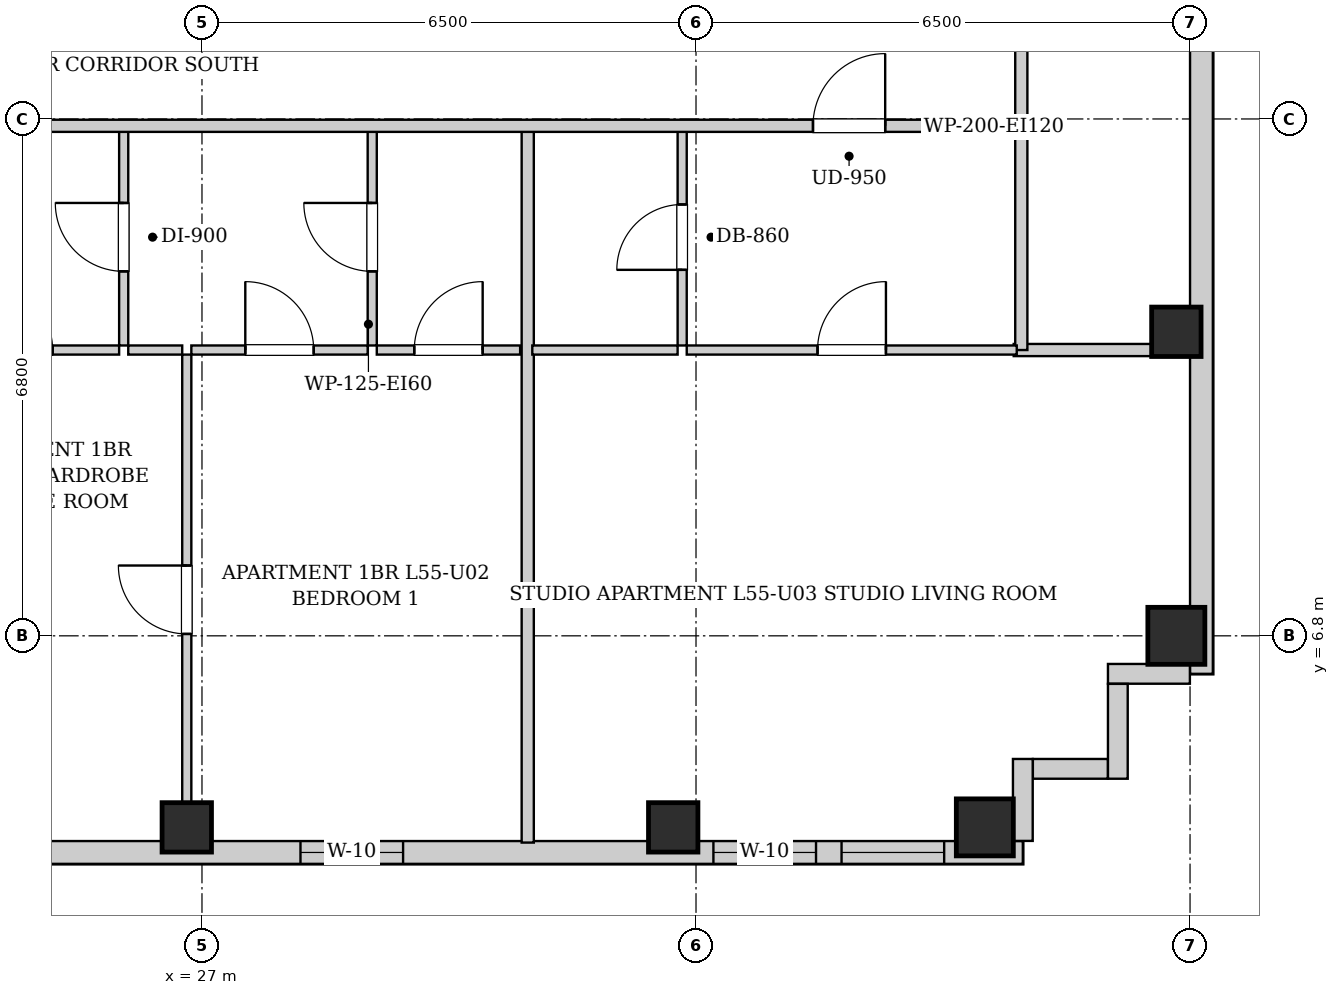
"""IFC4 building model, lengths in metres.
Left out: names, types, materials, properties, quantities, classifications, styles, units other than length and angle.
Written with IfcOpenShell. Run it as: python <this file> out.ifc"""

import sys

from ifc_helpers import new_model, si_unit, direction, frame, frame_2d, origin, origin_2d, place, context, subcontext, project, spatial, rectangle, extrude, element, fill, save


model = new_model("IFC4")
c1 = context("Model", 3, precision=1e-05, world=origin(), true_north=direction((0.0, 1.0)))
c2 = subcontext(c1, "Body", "Model", "MODEL_VIEW")
j1 = project(units=[si_unit("LENGTHUNIT", "METRE"), si_unit("PLANEANGLEUNIT", "RADIAN")], contexts=[c1])
p1 = place(None, origin())
s1 = spatial("IfcSite", under=j1, at=p1, CompositionType="ELEMENT")
p2 = place(p1, origin())
s2 = spatial("IfcBuilding", under=s1, at=p2, CompositionType="ELEMENT")
p3 = place(p2, frame((0.0, 0.0, 190.9)))
s3 = spatial("IfcBuildingStorey", under=s2, at=p3, CompositionType="ELEMENT", Elevation=190.9)
for number, where, z_axis, x_axis in (
    (1, (26.8, 4.28, 0.0), (0.0, 0.0, 1.0), (1.0, 0.0, 0.0)),
    (2, (33.2, 4.28, 0.0), (0.0, 0.0, 1.0), (1.0, 0.0, 0.0)),
):
    element("IfcColumn", number, at=place(p3, frame(where, z_axis=z_axis, x_axis=x_axis)), inside=s3, PredefinedType="COLUMN", context=c2, shape_type="SweptSolid", body=[
        extrude(rectangle(XDim=0.65, YDim=0.65, at=origin_2d()), origin(), (0.0, 0.0, 1.0), 3.3),
    ])
for number, where, z_axis, x_axis in (
    (3, (37.3, 4.28, 0.0), (0.0, 0.0, 1.0), (1.0, 0.0, 0.0)),
    (4, (39.82, 6.8, 0.0), (0.0, 0.0, 1.0), (1.0, 0.0, 0.0)),
):
    element("IfcColumn", number, at=place(p3, frame(where, z_axis=z_axis, x_axis=x_axis)), inside=s3, PredefinedType="COLUMN", context=c2, shape_type="SweptSolid", body=[
        extrude(rectangle(XDim=0.75, YDim=0.75, at=origin_2d()), origin(), (0.0, 0.0, 1.0), 3.3),
    ])
p4 = place(p3, frame((39.82, 10.8, 0.0), z_axis=(0.0, 0.0, 1.0), x_axis=(1.0, 0.0, 0.0)))
e5 = element("IfcColumn", 5, at=p4, inside=s3, PredefinedType="COLUMN", context=c2, shape_type="SweptSolid", body=[
    extrude(rectangle(XDim=0.65, YDim=0.65, at=origin_2d()), origin(), (0.0, 0.0, 1.0), 3.3),
])
p5 = place(p3, frame((40.15, 37.7, 0.0), z_axis=(0.0, 0.0, 1.0), x_axis=(0.0, -1.0, 0.0)))
e6 = element("IfcWall", 6, at=p5, inside=s3, PredefinedType="SOLIDWALL", context=c2, shape_type="SweptSolid", body=[
    extrude(rectangle(XDim=31.4, YDim=0.3, at=frame_2d((15.7, 0.0))), origin(), (0.0, 0.0, 1.0), 3.04),
])
p6 = place(p5, frame((1.504, 0.0, 0.55)))
e7 = element("IfcOpeningElement", 7, at=p6, cuts=e6, PredefinedType="OPENING", context=c2, shape_type="SweptSolid", body=[
    extrude(rectangle(XDim=1.35, YDim=1.2, at=frame_2d((0.675, 0.6))), frame((0.0, 0.16, 0.0), z_axis=(0.0, -1.0, 0.0), x_axis=(1.0, 0.0, 0.0)), (0.0, 0.0, 1.0), 0.32),
])
p7 = place(p5, frame((18.2, 0.0, 0.55)))
e8 = element("IfcOpeningElement", 8, at=p7, cuts=e6, PredefinedType="OPENING", context=c2, shape_type="SweptSolid", body=[
    extrude(rectangle(XDim=1.35, YDim=1.2, at=frame_2d((0.675, 0.6))), frame((0.0, 0.16, 0.0), z_axis=(0.0, -1.0, 0.0), x_axis=(1.0, 0.0, 0.0)), (0.0, 0.0, 1.0), 0.32),
])
p8 = place(p5, frame((19.81, 0.0, 0.55)))
e9 = element("IfcOpeningElement", 9, at=p8, cuts=e6, PredefinedType="OPENING", context=c2, shape_type="SweptSolid", body=[
    extrude(rectangle(XDim=1.35, YDim=1.2, at=frame_2d((0.675, 0.6))), frame((0.0, 0.16, 0.0), z_axis=(0.0, -1.0, 0.0), x_axis=(1.0, 0.0, 0.0)), (0.0, 0.0, 1.0), 0.32),
])
p9 = place(p5, frame((11.043, 0.0, 0.55)))
e10 = element("IfcOpeningElement", 10, at=p9, cuts=e6, PredefinedType="OPENING", context=c2, shape_type="SweptSolid", body=[
    extrude(rectangle(XDim=1.35, YDim=1.2, at=frame_2d((0.675, 0.6))), frame((0.0, 0.16, 0.0), z_axis=(0.0, -1.0, 0.0), x_axis=(1.0, 0.0, 0.0)), (0.0, 0.0, 1.0), 0.32),
])
p10 = place(p5, frame((9.185, 0.0, 0.55)))
e11 = element("IfcOpeningElement", 11, at=p10, cuts=e6, PredefinedType="OPENING", context=c2, shape_type="SweptSolid", body=[
    extrude(rectangle(XDim=1.35, YDim=1.2, at=frame_2d((0.675, 0.6))), frame((0.0, 0.16, 0.0), z_axis=(0.0, -1.0, 0.0), x_axis=(1.0, 0.0, 0.0)), (0.0, 0.0, 1.0), 0.32),
])
p11 = place(p3, frame((37.8, 3.95, 0.0), z_axis=(0.0, 0.0, 1.0), x_axis=(-1.0, 0.0, 0.0)))
e12 = element("IfcWall", 12, at=p11, inside=s3, PredefinedType="SOLIDWALL", context=c2, shape_type="SweptSolid", body=[
    extrude(rectangle(XDim=16.3, YDim=0.3, at=frame_2d((8.15, 0.0))), origin(), (0.0, 0.0, 1.0), 3.04),
])
p12 = place(p11, frame((15.3, 0.0, 0.55)))
e13 = element("IfcOpeningElement", 13, at=p12, cuts=e12, PredefinedType="OPENING", context=c2, shape_type="SweptSolid", body=[
    extrude(rectangle(XDim=0.68, YDim=1.2, at=frame_2d((0.34, 0.6))), frame((0.0, 0.16, 0.0), z_axis=(0.0, -1.0, 0.0), x_axis=(1.0, 0.0, 0.0)), (0.0, 0.0, 1.0), 0.32),
])
p13 = place(p11, frame((8.154, 0.0, 0.55)))
e14 = element("IfcOpeningElement", 14, at=p13, cuts=e12, PredefinedType="OPENING", context=c2, shape_type="SweptSolid", body=[
    extrude(rectangle(XDim=1.35, YDim=1.2, at=frame_2d((0.675, 0.6))), frame((0.0, 0.16, 0.0), z_axis=(0.0, -1.0, 0.0), x_axis=(1.0, 0.0, 0.0)), (0.0, 0.0, 1.0), 0.32),
])
p14 = place(p11, frame((2.721, 0.0, 0.55)))
e15 = element("IfcOpeningElement", 15, at=p14, cuts=e12, PredefinedType="OPENING", context=c2, shape_type="SweptSolid", body=[
    extrude(rectangle(XDim=1.35, YDim=1.2, at=frame_2d((0.675, 0.6))), frame((0.0, 0.16, 0.0), z_axis=(0.0, -1.0, 0.0), x_axis=(1.0, 0.0, 0.0)), (0.0, 0.0, 1.0), 0.32),
])
p15 = place(p11, frame((1.035, 0.0, 0.55)))
e16 = element("IfcOpeningElement", 16, at=p15, cuts=e12, PredefinedType="OPENING", context=c2, shape_type="SweptSolid", body=[
    extrude(rectangle(XDim=1.35, YDim=1.2, at=frame_2d((0.675, 0.6))), frame((0.0, 0.16, 0.0), z_axis=(0.0, -1.0, 0.0), x_axis=(1.0, 0.0, 0.0)), (0.0, 0.0, 1.0), 0.32),
])
p16 = place(p3, frame((39.998, 6.3, 0.0), z_axis=(0.0, 0.0, 1.0), x_axis=(-1.0, 0.0, 0.0)))
e17 = element("IfcWall", 17, at=p16, inside=s3, PredefinedType="SOLIDWALL", context=c2, shape_type="SweptSolid", body=[
    extrude(rectangle(XDim=1.078, YDim=0.26, at=frame_2d((0.539, 0.0))), origin(), (0.0, 0.0, 1.0), 3.04),
])
p17 = place(p3, frame((39.05, 6.168, 0.0), z_axis=(0.0, 0.0, 1.0), x_axis=(0.0, -1.0, 0.0)))
e18 = element("IfcWall", 18, at=p17, inside=s3, PredefinedType="SOLIDWALL", context=c2, shape_type="SweptSolid", body=[
    extrude(rectangle(XDim=1.248, YDim=0.26, at=frame_2d((0.624, 0.0))), origin(), (0.0, 0.0, 1.0), 3.04),
])
p18 = place(p3, frame((38.918, 5.05, 0.0), z_axis=(0.0, 0.0, 1.0), x_axis=(-1.0, 0.0, 0.0)))
e19 = element("IfcWall", 19, at=p18, inside=s3, PredefinedType="SOLIDWALL", context=c2, shape_type="SweptSolid", body=[
    extrude(rectangle(XDim=0.986, YDim=0.26, at=frame_2d((0.493, 0.0))), origin(), (0.0, 0.0, 1.0), 3.04),
])
p19 = place(p3, frame((37.8, 5.18, 0.0), z_axis=(0.0, 0.0, 1.0), x_axis=(0.0, -1.0, 0.0)))
e20 = element("IfcWall", 20, at=p19, inside=s3, PredefinedType="SOLIDWALL", context=c2, shape_type="SweptSolid", body=[
    extrude(rectangle(XDim=1.078, YDim=0.26, at=frame_2d((0.539, 0.0))), origin(), (0.0, 0.0, 1.0), 3.04),
])
p20 = place(p3, frame((37.78, 13.51, 0.0), z_axis=(0.0, 0.0, 1.0), x_axis=(0.0, 1.0, 0.0)))
e21 = element("IfcWall", 21, at=p20, inside=s3, PredefinedType="PARTITIONING", context=c2, shape_type="SweptSolid", body=[
    extrude(rectangle(XDim=1.58, YDim=0.16, at=frame_2d((0.79, 0.0))), origin(), (0.0, 0.0, 1.0), 3.04),
])
p21 = place(p3, frame((25.97, 10.62, 0.0), z_axis=(0.0, 0.0, 1.0), x_axis=(0.0, 1.0, 0.0)))
e22 = element("IfcWall", 22, at=p21, inside=s3, PredefinedType="PARTITIONING", context=c2, shape_type="SweptSolid", body=[
    extrude(rectangle(XDim=2.85, YDim=0.12, at=frame_2d((1.425, 0.0))), origin(), (0.0, 0.0, 1.0), 3.04),
])
p22 = place(p21, frame((0.975, 0.0, 0.0)))
e23 = element("IfcOpeningElement", 23, at=p22, cuts=e22, PredefinedType="OPENING", context=c2, shape_type="SweptSolid", body=[
    extrude(rectangle(XDim=0.9, YDim=2.05, at=frame_2d((0.45, 1.025))), frame((0.0, 0.07, 0.0), z_axis=(0.0, -1.0, 0.0), x_axis=(1.0, 0.0, 0.0)), (0.0, 0.0, 1.0), 0.14),
])
p23 = place(p3, frame((23.26, 10.56, 0.0), z_axis=(0.0, 0.0, 1.0), x_axis=(1.0, 0.0, 0.0)))
e24 = element("IfcWall", 24, at=p23, inside=s3, PredefinedType="PARTITIONING", context=c2, shape_type="SweptSolid", body=[
    extrude(rectangle(XDim=2.65, YDim=0.12, at=frame_2d((1.325, 0.0))), origin(), (0.0, 0.0, 1.0), 3.04),
])
p24 = place(p23, frame((0.875, 0.0, 0.0)))
e25 = element("IfcOpeningElement", 25, at=p24, cuts=e24, PredefinedType="OPENING", context=c2, shape_type="SweptSolid", body=[
    extrude(rectangle(XDim=0.9, YDim=2.05, at=frame_2d((0.45, 1.025))), frame((0.0, 0.07, 0.0), z_axis=(0.0, -1.0, 0.0), x_axis=(1.0, 0.0, 0.0)), (0.0, 0.0, 1.0), 0.14),
])
p25 = place(p3, frame((29.24, 10.62, 0.0), z_axis=(0.0, 0.0, 1.0), x_axis=(0.0, 1.0, 0.0)))
e26 = element("IfcWall", 26, at=p25, inside=s3, PredefinedType="PARTITIONING", context=c2, shape_type="SweptSolid", body=[
    extrude(rectangle(XDim=2.85, YDim=0.12, at=frame_2d((1.425, 0.0))), origin(), (0.0, 0.0, 1.0), 3.04),
])
p26 = place(p25, frame((0.975, 0.0, 0.0)))
e27 = element("IfcOpeningElement", 27, at=p26, cuts=e26, PredefinedType="OPENING", context=c2, shape_type="SweptSolid", body=[
    extrude(rectangle(XDim=0.9, YDim=2.05, at=frame_2d((0.45, 1.025))), frame((0.0, 0.07, 0.0), z_axis=(0.0, -1.0, 0.0), x_axis=(1.0, 0.0, 0.0)), (0.0, 0.0, 1.0), 0.14),
])
p27 = place(p3, frame((26.03, 10.56, 0.0), z_axis=(0.0, 0.0, 1.0), x_axis=(1.0, 0.0, 0.0)))
e28 = element("IfcWall", 28, at=p27, inside=s3, PredefinedType="PARTITIONING", context=c2, shape_type="SweptSolid", body=[
    extrude(rectangle(XDim=0.71, YDim=0.12, at=frame_2d((0.355, 0.0))), origin(), (0.0, 0.0, 1.0), 3.04),
])
p28 = place(p3, frame((26.86, 10.56, 0.0), z_axis=(0.0, 0.0, 1.0), x_axis=(1.0, 0.0, 0.0)))
e29 = element("IfcWall", 29, at=p28, inside=s3, PredefinedType="PARTITIONING", context=c2, shape_type="SweptSolid", body=[
    extrude(rectangle(XDim=2.32, YDim=0.12, at=frame_2d((1.16, 0.0))), origin(), (0.0, 0.0, 1.0), 3.04),
])
p29 = place(p28, frame((0.71, 0.0, 0.0)))
e30 = element("IfcOpeningElement", 30, at=p29, cuts=e29, PredefinedType="OPENING", context=c2, shape_type="SweptSolid", body=[
    extrude(rectangle(XDim=0.9, YDim=2.05, at=frame_2d((0.45, 1.025))), frame((0.0, 0.07, 0.0), z_axis=(0.0, -1.0, 0.0), x_axis=(1.0, 0.0, 0.0)), (0.0, 0.0, 1.0), 0.14),
])
p30 = place(p3, frame((29.3, 10.56, 0.0), z_axis=(0.0, 0.0, 1.0), x_axis=(1.0, 0.0, 0.0)))
e31 = element("IfcWall", 31, at=p30, inside=s3, PredefinedType="PARTITIONING", context=c2, shape_type="SweptSolid", body=[
    extrude(rectangle(XDim=1.886, YDim=0.12, at=frame_2d((0.943, 0.0))), origin(), (0.0, 0.0, 1.0), 3.04),
])
p31 = place(p30, frame((0.493, 0.0, 0.0)))
e32 = element("IfcOpeningElement", 32, at=p31, cuts=e31, PredefinedType="OPENING", context=c2, shape_type="SweptSolid", body=[
    extrude(rectangle(XDim=0.9, YDim=2.05, at=frame_2d((0.45, 1.025))), frame((0.0, 0.07, 0.0), z_axis=(0.0, -1.0, 0.0), x_axis=(1.0, 0.0, 0.0)), (0.0, 0.0, 1.0), 0.14),
])
p32 = place(p3, frame((26.8, 4.08, 0.0), z_axis=(0.0, 0.0, 1.0), x_axis=(0.0, 1.0, 0.0)))
e33 = element("IfcWall", 33, at=p32, inside=s3, PredefinedType="PARTITIONING", context=c2, shape_type="SweptSolid", body=[
    extrude(rectangle(XDim=6.42, YDim=0.12, at=frame_2d((3.21, 0.0))), origin(), (0.0, 0.0, 1.0), 3.04),
])
p33 = place(p32, frame((2.745, 0.0, 0.0)))
e34 = element("IfcOpeningElement", 34, at=p33, cuts=e33, PredefinedType="OPENING", context=c2, shape_type="SweptSolid", body=[
    extrude(rectangle(XDim=0.9, YDim=2.05, at=frame_2d((0.45, 1.025))), frame((0.0, 0.07, 0.0), z_axis=(0.0, -1.0, 0.0), x_axis=(1.0, 0.0, 0.0)), (0.0, 0.0, 1.0), 0.14),
])
p34 = place(p3, frame((37.68, 10.56, 0.0), z_axis=(0.0, 0.0, 1.0), x_axis=(1.0, 0.0, 0.0)))
e35 = element("IfcWall", 35, at=p34, inside=s3, PredefinedType="PARTITIONING", context=c2, shape_type="SweptSolid", body=[
    extrude(rectangle(XDim=2.34, YDim=0.16, at=frame_2d((1.17, 0.0))), origin(), (0.0, 0.0, 1.0), 3.04),
])
p35 = place(p3, frame((37.78, 10.56, 0.0), z_axis=(0.0, 0.0, 1.0), x_axis=(0.0, 1.0, 0.0)))
e36 = element("IfcWall", 36, at=p35, inside=s3, PredefinedType="PARTITIONING", context=c2, shape_type="SweptSolid", body=[
    extrude(rectangle(XDim=2.91, YDim=0.16, at=frame_2d((1.455, 0.0))), origin(), (0.0, 0.0, 1.0), 3.04),
])
p36 = place(p3, frame((31.286, 4.08, 0.0), z_axis=(0.0, 0.0, 1.0), x_axis=(0.0, 1.0, 0.0)))
e37 = element("IfcWall", 37, at=p36, inside=s3, PredefinedType="PARTITIONING", context=c2, shape_type="SweptSolid", body=[
    extrude(rectangle(XDim=9.39, YDim=0.16, at=frame_2d((4.695, 0.0))), origin(), (0.0, 0.0, 1.0), 3.04),
])
p37 = place(p3, frame((33.318, 10.62, 0.0), z_axis=(0.0, 0.0, 1.0), x_axis=(0.0, 1.0, 0.0)))
e38 = element("IfcWall", 38, at=p37, inside=s3, PredefinedType="PARTITIONING", context=c2, shape_type="SweptSolid", body=[
    extrude(rectangle(XDim=2.85, YDim=0.12, at=frame_2d((1.425, 0.0))), origin(), (0.0, 0.0, 1.0), 3.04),
])
p38 = place(p37, frame((0.995, 0.0, 0.0)))
e39 = element("IfcOpeningElement", 39, at=p38, cuts=e38, PredefinedType="OPENING", context=c2, shape_type="SweptSolid", body=[
    extrude(rectangle(XDim=0.86, YDim=2.05, at=frame_2d((0.43, 1.025))), frame((0.0, 0.07, 0.0), z_axis=(0.0, -1.0, 0.0), x_axis=(1.0, 0.0, 0.0)), (0.0, 0.0, 1.0), 0.14),
])
p39 = place(p3, frame((31.346, 10.56, 0.0), z_axis=(0.0, 0.0, 1.0), x_axis=(1.0, 0.0, 0.0)))
e40 = element("IfcWall", 40, at=p39, inside=s3, PredefinedType="PARTITIONING", context=c2, shape_type="SweptSolid", body=[
    extrude(rectangle(XDim=1.912, YDim=0.12, at=frame_2d((0.956, 0.0))), origin(), (0.0, 0.0, 1.0), 3.04),
])
p40 = place(p3, frame((33.378, 10.56, 0.0), z_axis=(0.0, 0.0, 1.0), x_axis=(1.0, 0.0, 0.0)))
e41 = element("IfcWall", 41, at=p40, inside=s3, PredefinedType="PARTITIONING", context=c2, shape_type="SweptSolid", body=[
    extrude(rectangle(XDim=4.342, YDim=0.12, at=frame_2d((2.171, 0.0))), origin(), (0.0, 0.0, 1.0), 3.04),
])
p41 = place(p40, frame((1.721, 0.0, 0.0)))
e42 = element("IfcOpeningElement", 42, at=p41, cuts=e41, PredefinedType="OPENING", context=c2, shape_type="SweptSolid", body=[
    extrude(rectangle(XDim=0.9, YDim=2.05, at=frame_2d((0.45, 1.025))), frame((0.0, 0.07, 0.0), z_axis=(0.0, -1.0, 0.0), x_axis=(1.0, 0.0, 0.0)), (0.0, 0.0, 1.0), 0.14),
])
p42 = place(p3, frame((13.15, 13.51, 0.0), z_axis=(0.0, 0.0, 1.0), x_axis=(1.0, 0.0, 0.0)))
e43 = element("IfcWall", 43, at=p42, inside=s3, PredefinedType="PARTITIONING", context=c2, shape_type="SweptSolid", body=[
    extrude(rectangle(XDim=24.6, YDim=0.16, at=frame_2d((12.3, 0.0))), origin(), (0.0, 0.0, 1.0), 3.04),
])
p43 = place(p42, frame((0.76, 0.0, 0.0)))
e44 = element("IfcOpeningElement", 44, at=p43, cuts=e43, PredefinedType="OPENING", context=c2, shape_type="SweptSolid", body=[
    extrude(rectangle(XDim=0.95, YDim=2.1, at=frame_2d((0.475, 1.05))), frame((0.0, 0.09, 0.0), z_axis=(0.0, -1.0, 0.0), x_axis=(1.0, 0.0, 0.0)), (0.0, 0.0, 1.0), 0.18),
])
p44 = place(p42, frame((6.465, 0.0, 0.0)))
e45 = element("IfcOpeningElement", 45, at=p44, cuts=e43, PredefinedType="OPENING", context=c2, shape_type="SweptSolid", body=[
    extrude(rectangle(XDim=0.95, YDim=2.1, at=frame_2d((0.475, 1.05))), frame((0.0, 0.09, 0.0), z_axis=(0.0, -1.0, 0.0), x_axis=(1.0, 0.0, 0.0)), (0.0, 0.0, 1.0), 0.18),
])
p45 = place(p42, frame((21.889, 0.0, 0.0)))
e46 = element("IfcOpeningElement", 46, at=p45, cuts=e43, PredefinedType="OPENING", context=c2, shape_type="SweptSolid", body=[
    extrude(rectangle(XDim=0.95, YDim=2.1, at=frame_2d((0.475, 1.05))), frame((0.0, 0.09, 0.0), z_axis=(0.0, -1.0, 0.0), x_axis=(1.0, 0.0, 0.0)), (0.0, 0.0, 1.0), 0.18),
])
p46 = place(p22, origin())
e47 = element("IfcDoor", 47, at=p46, inside=s3, OperationType="SINGLE_SWING_RIGHT", PredefinedType="DOOR", context=c2, shape_type="SweptSolid", body=[
    extrude(rectangle(XDim=0.9, YDim=2.05, at=frame_2d((0.45, 1.025))), frame((0.0, 0.025, 0.0), z_axis=(0.0, -1.0, 0.0), x_axis=(1.0, 0.0, 0.0)), (0.0, 0.0, 1.0), 0.05),
])
fill(e23, e47)
p47 = place(p24, origin())
e48 = element("IfcDoor", 48, at=p47, inside=s3, OperationType="SINGLE_SWING_LEFT", PredefinedType="DOOR", context=c2, shape_type="SweptSolid", body=[
    extrude(rectangle(XDim=0.9, YDim=2.05, at=frame_2d((0.45, 1.025))), frame((0.0, 0.025, 0.0), z_axis=(0.0, -1.0, 0.0), x_axis=(1.0, 0.0, 0.0)), (0.0, 0.0, 1.0), 0.05),
])
fill(e25, e48)
p48 = place(p26, origin())
e49 = element("IfcDoor", 49, at=p48, inside=s3, OperationType="SINGLE_SWING_RIGHT", PredefinedType="DOOR", context=c2, shape_type="SweptSolid", body=[
    extrude(rectangle(XDim=0.9, YDim=2.05, at=frame_2d((0.45, 1.025))), frame((0.0, 0.025, 0.0), z_axis=(0.0, -1.0, 0.0), x_axis=(1.0, 0.0, 0.0)), (0.0, 0.0, 1.0), 0.05),
])
fill(e27, e49)
p49 = place(p29, origin())
e50 = element("IfcDoor", 50, at=p49, inside=s3, OperationType="SINGLE_SWING_LEFT", PredefinedType="DOOR", context=c2, shape_type="SweptSolid", body=[
    extrude(rectangle(XDim=0.9, YDim=2.05, at=frame_2d((0.45, 1.025))), frame((0.0, 0.025, 0.0), z_axis=(0.0, -1.0, 0.0), x_axis=(1.0, 0.0, 0.0)), (0.0, 0.0, 1.0), 0.05),
])
fill(e30, e50)
p50 = place(p31, origin())
e51 = element("IfcDoor", 51, at=p50, inside=s3, OperationType="SINGLE_SWING_RIGHT", PredefinedType="DOOR", context=c2, shape_type="SweptSolid", body=[
    extrude(rectangle(XDim=0.9, YDim=2.05, at=frame_2d((0.45, 1.025))), frame((0.0, 0.025, 0.0), z_axis=(0.0, -1.0, 0.0), x_axis=(1.0, 0.0, 0.0)), (0.0, 0.0, 1.0), 0.05),
])
fill(e32, e51)
p51 = place(p33, origin())
e52 = element("IfcDoor", 52, at=p51, inside=s3, OperationType="SINGLE_SWING_RIGHT", PredefinedType="DOOR", context=c2, shape_type="SweptSolid", body=[
    extrude(rectangle(XDim=0.9, YDim=2.05, at=frame_2d((0.45, 1.025))), frame((0.0, 0.025, 0.0), z_axis=(0.0, -1.0, 0.0), x_axis=(1.0, 0.0, 0.0)), (0.0, 0.0, 1.0), 0.05),
])
fill(e34, e52)
p52 = place(p38, origin())
e53 = element("IfcDoor", 53, at=p52, inside=s3, OperationType="SINGLE_SWING_LEFT", PredefinedType="DOOR", context=c2, shape_type="SweptSolid", body=[
    extrude(rectangle(XDim=0.86, YDim=2.05, at=frame_2d((0.43, 1.025))), frame((0.0, 0.025, 0.0), z_axis=(0.0, -1.0, 0.0), x_axis=(1.0, 0.0, 0.0)), (0.0, 0.0, 1.0), 0.05),
])
fill(e39, e53)
p53 = place(p41, origin())
e54 = element("IfcDoor", 54, at=p53, inside=s3, OperationType="SINGLE_SWING_RIGHT", PredefinedType="DOOR", context=c2, shape_type="SweptSolid", body=[
    extrude(rectangle(XDim=0.9, YDim=2.05, at=frame_2d((0.45, 1.025))), frame((0.0, 0.025, 0.0), z_axis=(0.0, -1.0, 0.0), x_axis=(1.0, 0.0, 0.0)), (0.0, 0.0, 1.0), 0.05),
])
fill(e42, e54)
p54 = place(p45, origin())
e55 = element("IfcDoor", 55, at=p54, inside=s3, OperationType="SINGLE_SWING_RIGHT", PredefinedType="DOOR", context=c2, shape_type="SweptSolid", body=[
    extrude(rectangle(XDim=0.95, YDim=2.1, at=frame_2d((0.475, 1.05))), frame((0.0, 0.025, 0.0), z_axis=(0.0, -1.0, 0.0), x_axis=(1.0, 0.0, 0.0)), (0.0, 0.0, 1.0), 0.05),
])
fill(e46, e55)
p55 = place(p13, origin())
e56 = element("IfcWindow", 56, at=p55, inside=s3, PartitioningType="SINGLE_PANEL", PredefinedType="WINDOW", context=c2, shape_type="SweptSolid", body=[
    extrude(rectangle(XDim=1.35, YDim=1.2, at=frame_2d((0.675, 0.6))), frame((0.0, 0.03, 0.0), z_axis=(0.0, -1.0, 0.0), x_axis=(1.0, 0.0, 0.0)), (0.0, 0.0, 1.0), 0.06),
])
fill(e14, e56)
p56 = place(p14, origin())
e57 = element("IfcWindow", 57, at=p56, inside=s3, PartitioningType="SINGLE_PANEL", PredefinedType="WINDOW", context=c2, shape_type="SweptSolid", body=[
    extrude(rectangle(XDim=1.35, YDim=1.2, at=frame_2d((0.675, 0.6))), frame((0.0, 0.03, 0.0), z_axis=(0.0, -1.0, 0.0), x_axis=(1.0, 0.0, 0.0)), (0.0, 0.0, 1.0), 0.06),
])
fill(e15, e57)
p57 = place(p15, origin())
e58 = element("IfcWindow", 58, at=p57, inside=s3, PartitioningType="SINGLE_PANEL", PredefinedType="WINDOW", context=c2, shape_type="SweptSolid", body=[
    extrude(rectangle(XDim=1.35, YDim=1.2, at=frame_2d((0.675, 0.6))), frame((0.0, 0.03, 0.0), z_axis=(0.0, -1.0, 0.0), x_axis=(1.0, 0.0, 0.0)), (0.0, 0.0, 1.0), 0.06),
])
fill(e16, e58)
save(model, sys.argv[1])
